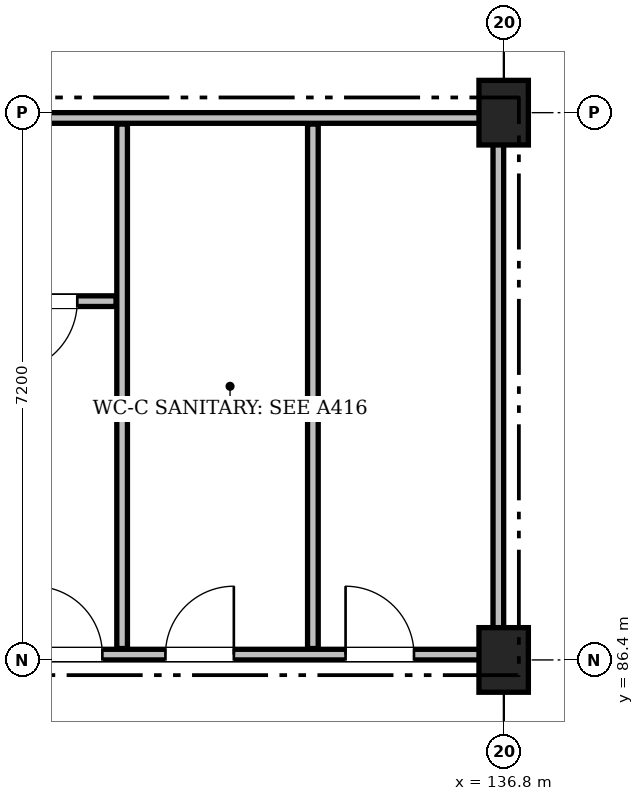
"""IFC4 building model, lengths in metres.
Left out: names, types, materials, properties, quantities, classifications, styles, units other than length and angle.
Written with IfcOpenShell. Run it as: python <this file> out.ifc"""

import sys

from ifc_helpers import new_model, si_unit, direction, frame, frame_2d, origin, origin_2d, place, context, subcontext, project, spatial, rectangle, extrude, element, fill, save


model = new_model("IFC4")
c1 = context("Model", 3, precision=1e-05, world=origin(), true_north=direction((0.0, 1.0)))
c2 = subcontext(c1, "Body", "Model", "MODEL_VIEW")
j1 = project(units=[si_unit("LENGTHUNIT", "METRE"), si_unit("PLANEANGLEUNIT", "RADIAN")], contexts=[c1])
p1 = place(None, origin())
s1 = spatial("IfcSite", under=j1, at=p1, CompositionType="ELEMENT")
p2 = place(p1, origin())
s2 = spatial("IfcBuilding", under=s1, at=p2, CompositionType="ELEMENT")
p3 = place(p2, frame((0.0, 0.0, 4.8)))
s3 = spatial("IfcBuildingStorey", under=s2, at=p3, CompositionType="ELEMENT", Elevation=4.8)
for number, where, z_axis, x_axis in (
    (1, (136.8, 86.4, 0.0), (0.0, 0.0, 1.0), (1.0, 0.0, 0.0)),
    (2, (136.8, 93.6, 0.0), (0.0, 0.0, 1.0), (1.0, 0.0, 0.0)),
):
    element("IfcColumn", number, at=place(p3, frame(where, z_axis=z_axis, x_axis=x_axis)), inside=s3, PredefinedType="COLUMN", context=c2, shape_type="SweptSolid", body=[
        extrude(rectangle(XDim=0.65, YDim=0.85, at=origin_2d()), origin(), (0.0, 0.0, 1.0), 4.8),
    ])
p4 = place(p3, frame((129.67, 86.47, 0.0), z_axis=(0.0, 0.0, 1.0), x_axis=(1.0, 0.0, 0.0)))
e3 = element("IfcWall", 3, at=p4, inside=s3, PredefinedType="PARTITIONING", context=c2, shape_type="SweptSolid", body=[
    extrude(rectangle(XDim=7.06, YDim=0.14, at=frame_2d((3.53, 0.0))), origin(), (0.0, 0.0, 1.0), 3.8),
])
p5 = place(p4, frame((0.95, 0.0, 0.0)))
e4 = element("IfcOpeningElement", 4, at=p5, cuts=e3, PredefinedType="OPENING", context=c2, shape_type="SweptSolid", body=[
    extrude(rectangle(XDim=0.9, YDim=2.08, at=frame_2d((0.45, 1.04))), frame((0.0, 0.082, 0.0), z_axis=(0.0, -1.0, 0.0), x_axis=(1.0, 0.0, 0.0)), (0.0, 0.0, 1.0), 0.164),
])
p6 = place(p4, frame((2.68, 0.0, 0.0)))
e5 = element("IfcOpeningElement", 5, at=p6, cuts=e3, PredefinedType="OPENING", context=c2, shape_type="SweptSolid", body=[
    extrude(rectangle(XDim=0.9, YDim=2.08, at=frame_2d((0.45, 1.04))), frame((0.0, 0.082, 0.0), z_axis=(0.0, -1.0, 0.0), x_axis=(1.0, 0.0, 0.0)), (0.0, 0.0, 1.0), 0.164),
])
p7 = place(p4, frame((5.05, 0.0, 0.0)))
e6 = element("IfcOpeningElement", 6, at=p7, cuts=e3, PredefinedType="OPENING", context=c2, shape_type="SweptSolid", body=[
    extrude(rectangle(XDim=0.9, YDim=2.08, at=frame_2d((0.45, 1.04))), frame((0.0, 0.082, 0.0), z_axis=(0.0, -1.0, 0.0), x_axis=(1.0, 0.0, 0.0)), (0.0, 0.0, 1.0), 0.164),
])
p8 = place(p3, frame((129.67, 93.53, 0.0), z_axis=(0.0, 0.0, 1.0), x_axis=(1.0, 0.0, 0.0)))
e7 = element("IfcWall", 7, at=p8, inside=s3, PredefinedType="PARTITIONING", context=c2, shape_type="SweptSolid", body=[
    extrude(rectangle(XDim=7.06, YDim=0.14, at=frame_2d((3.53, 0.0))), origin(), (0.0, 0.0, 1.0), 3.8),
])
p9 = place(p3, frame((136.73, 86.55, 0.0), z_axis=(0.0, 0.0, 1.0), x_axis=(0.0, 1.0, 0.0)))
e8 = element("IfcWall", 8, at=p9, inside=s3, PredefinedType="PARTITIONING", context=c2, shape_type="SweptSolid", body=[
    extrude(rectangle(XDim=6.9, YDim=0.14, at=frame_2d((3.45, 0.0))), origin(), (0.0, 0.0, 1.0), 4.08),
])
for number, where, z_axis, x_axis in (
    (9, (131.78, 86.55, 0.0), (0.0, 0.0, 1.0), (0.0, 1.0, 0.0)),
    (10, (134.29, 86.55, 0.0), (0.0, 0.0, 1.0), (0.0, 1.0, 0.0)),
):
    element("IfcWall", number, at=place(p3, frame(where, z_axis=z_axis, x_axis=x_axis)), inside=s3, PredefinedType="PARTITIONING", context=c2, shape_type="SweptSolid", body=[
        extrude(rectangle(XDim=6.9, YDim=0.14, at=frame_2d((3.45, 0.0))), origin(), (0.0, 0.0, 1.0), 4.46),
    ])
p10 = place(p3, frame((129.75, 91.12, 0.0), z_axis=(0.0, 0.0, 1.0), x_axis=(1.0, 0.0, 0.0)))
e11 = element("IfcWall", 11, at=p10, inside=s3, PredefinedType="PARTITIONING", context=c2, shape_type="SweptSolid", body=[
    extrude(rectangle(XDim=1.95, YDim=0.14, at=frame_2d((0.975, 0.0))), origin(), (0.0, 0.0, 1.0), 4.46),
])
p11 = place(p10, frame((0.5, 0.0, 0.0)))
e12 = element("IfcOpeningElement", 12, at=p11, cuts=e11, PredefinedType="OPENING", context=c2, shape_type="SweptSolid", body=[
    extrude(rectangle(XDim=0.94, YDim=2.1, at=frame_2d((0.47, 1.05))), frame((0.0, 0.082, 0.0), z_axis=(0.0, -1.0, 0.0), x_axis=(1.0, 0.0, 0.0)), (0.0, 0.0, 1.0), 0.164),
])
p12 = place(p5, origin())
e13 = element("IfcDoor", 13, at=p12, inside=s3, OperationType="SINGLE_SWING_LEFT", PredefinedType="DOOR", context=c2, shape_type="SweptSolid", body=[
    extrude(rectangle(XDim=0.9, YDim=2.08, at=frame_2d((0.45, 1.04))), frame((0.0, 0.025, 0.0), z_axis=(0.0, -1.0, 0.0), x_axis=(1.0, 0.0, 0.0)), (0.0, 0.0, 1.0), 0.05),
])
fill(e4, e13)
p13 = place(p6, origin())
e14 = element("IfcDoor", 14, at=p13, inside=s3, OperationType="SINGLE_SWING_RIGHT", PredefinedType="DOOR", context=c2, shape_type="SweptSolid", body=[
    extrude(rectangle(XDim=0.9, YDim=2.08, at=frame_2d((0.45, 1.04))), frame((0.0, 0.025, 0.0), z_axis=(0.0, -1.0, 0.0), x_axis=(1.0, 0.0, 0.0)), (0.0, 0.0, 1.0), 0.05),
])
fill(e5, e14)
p14 = place(p7, origin())
e15 = element("IfcDoor", 15, at=p14, inside=s3, OperationType="SINGLE_SWING_LEFT", PredefinedType="DOOR", context=c2, shape_type="SweptSolid", body=[
    extrude(rectangle(XDim=0.9, YDim=2.08, at=frame_2d((0.45, 1.04))), frame((0.0, 0.025, 0.0), z_axis=(0.0, -1.0, 0.0), x_axis=(1.0, 0.0, 0.0)), (0.0, 0.0, 1.0), 0.05),
])
fill(e6, e15)
p15 = place(p11, frame((0.94, 0.0, 0.0), z_axis=(0.0, 0.0, 1.0), x_axis=(-1.0, 0.0, 0.0)))
e16 = element("IfcDoor", 16, at=p15, inside=s3, OperationType="SINGLE_SWING_RIGHT", PredefinedType="DOOR", context=c2, shape_type="SweptSolid", body=[
    extrude(rectangle(XDim=0.94, YDim=2.1, at=frame_2d((0.47, 1.05))), frame((0.0, 0.025, 0.0), z_axis=(0.0, -1.0, 0.0), x_axis=(1.0, 0.0, 0.0)), (0.0, 0.0, 1.0), 0.05),
])
fill(e12, e16)
save(model, sys.argv[1])
